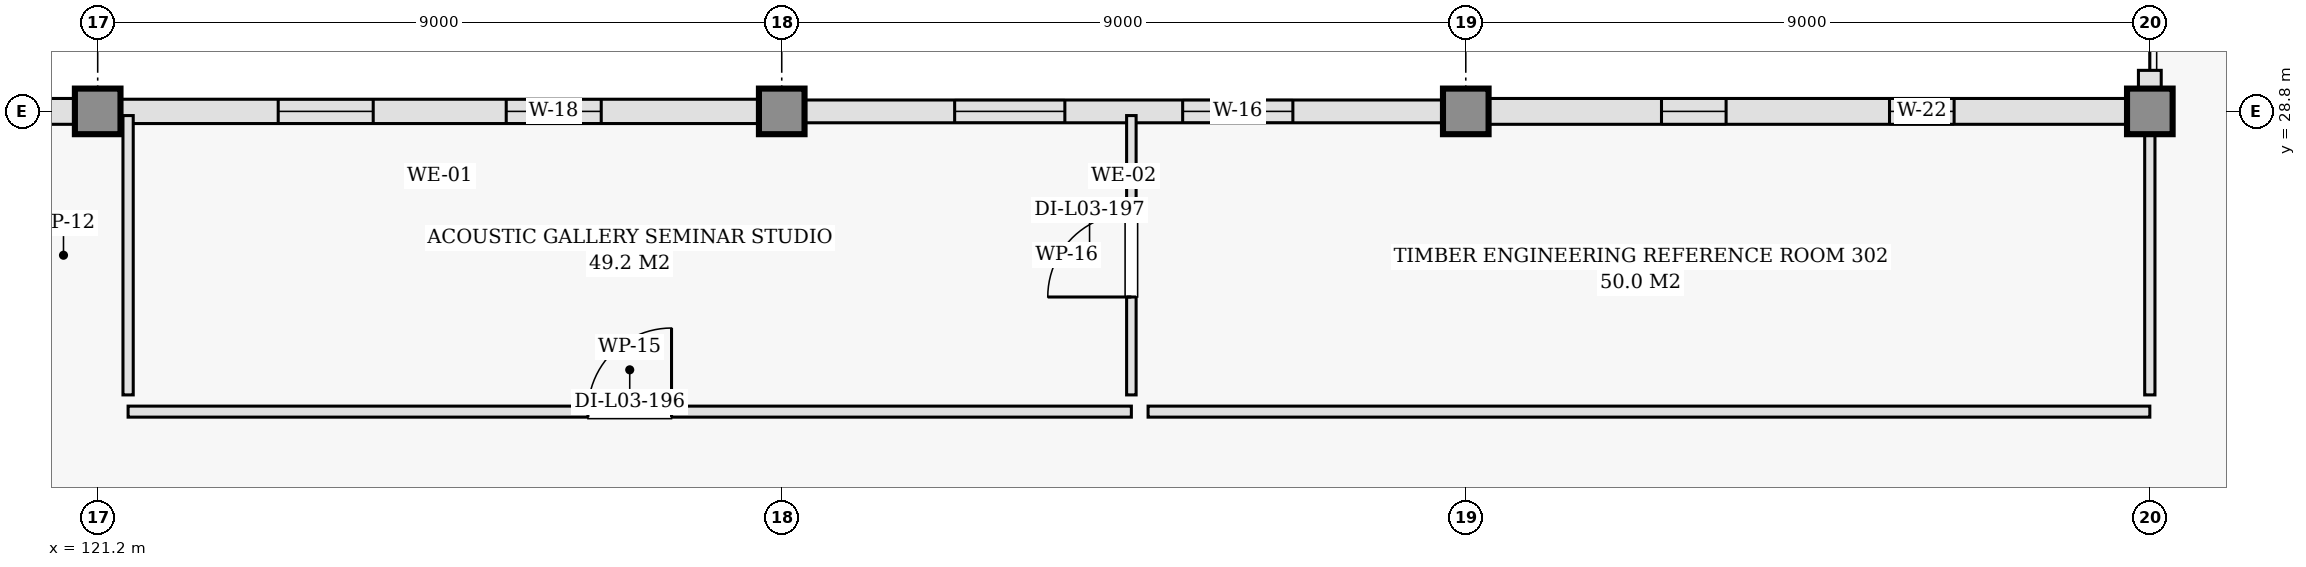
"""IFC4 building model, lengths in metres.
Left out: names, types, materials, properties, quantities, classifications, styles, units other than length and angle.
Written with IfcOpenShell. Run it as: python <this file> out.ifc"""

import sys

from ifc_helpers import new_model, si_unit, direction, frame, frame_2d, origin, origin_2d, place, context, subcontext, project, spatial, rectangle, extrude, element, fill, save


model = new_model("IFC4")
c1 = context("Model", 3, precision=1e-05, world=origin(), true_north=direction((0.0, 1.0)))
c2 = subcontext(c1, "Body", "Model", "MODEL_VIEW")
j1 = project(units=[si_unit("LENGTHUNIT", "METRE"), si_unit("PLANEANGLEUNIT", "RADIAN")], contexts=[c1])
p1 = place(None, origin())
s1 = spatial("IfcSite", under=j1, at=p1, CompositionType="ELEMENT")
p2 = place(p1, origin())
s2 = spatial("IfcBuilding", under=s1, at=p2, CompositionType="ELEMENT")
p3 = place(p2, frame((0.0, 0.0, 13.8)))
s3 = spatial("IfcBuildingStorey", under=s2, at=p3, CompositionType="ELEMENT", Elevation=13.8)
for number, where, z_axis, x_axis in (
    (1, (121.2, 28.8, 0.0), (0.0, 0.0, 1.0), (1.0, 0.0, 0.0)),
    (2, (130.2, 28.8, 0.0), (0.0, 0.0, 1.0), (1.0, 0.0, 0.0)),
    (3, (139.2, 28.8, 0.0), (0.0, 0.0, 1.0), (1.0, 0.0, 0.0)),
    (4, (148.2, 28.8, 0.0), (0.0, 0.0, 1.0), (1.0, 0.0, 0.0)),
):
    element("IfcColumn", number, at=place(p3, frame(where, z_axis=z_axis, x_axis=x_axis)), inside=s3, PredefinedType="COLUMN", context=c2, shape_type="SweptSolid", body=[
        extrude(rectangle(XDim=0.6, YDim=0.6, at=origin_2d()), origin(), (0.0, 0.0, 1.0), 4.2),
    ])
p4 = place(p3, frame((148.2, 29.34, 0.0), z_axis=(0.0, 0.0, 1.0), x_axis=(0.0, -1.0, 0.0)))
e5 = element("IfcWall", 5, at=p4, inside=s3, PredefinedType="SOLIDWALL", context=c2, shape_type="SweptSolid", body=[
    extrude(rectangle(XDim=0.368, YDim=0.3, at=frame_2d((0.184, 0.0))), origin(), (0.0, 0.0, 1.0), 3.145),
])
p5 = place(p3, frame((148.2, 28.8, 0.0), z_axis=(0.0, 0.0, 1.0), x_axis=(-1.0, 0.0, 0.0)))
e6 = element("IfcWall", 6, at=p5, inside=s3, PredefinedType="SOLIDWALL", context=c2, shape_type="SweptSolid", body=[
    extrude(rectangle(XDim=9.0, YDim=0.34, at=frame_2d((4.5, 0.0))), origin(), (0.0, 0.0, 1.0), 3.145),
])
p6 = place(p5, frame((2.575, 0.0, 0.9)))
e7 = element("IfcOpeningElement", 7, at=p6, cuts=e6, PredefinedType="OPENING", context=c2, shape_type="SweptSolid", body=[
    extrude(rectangle(XDim=0.85, YDim=1.3, at=frame_2d((0.425, 0.65))), frame((0.0, 0.18, 0.0), z_axis=(0.0, -1.0, 0.0), x_axis=(1.0, 0.0, 0.0)), (0.0, 0.0, 1.0), 0.36),
])
p7 = place(p5, frame((5.575, 0.0, 0.9)))
e8 = element("IfcOpeningElement", 8, at=p7, cuts=e6, PredefinedType="OPENING", context=c2, shape_type="SweptSolid", body=[
    extrude(rectangle(XDim=0.85, YDim=1.3, at=frame_2d((0.425, 0.65))), frame((0.0, 0.18, 0.0), z_axis=(0.0, -1.0, 0.0), x_axis=(1.0, 0.0, 0.0)), (0.0, 0.0, 1.0), 0.36),
])
p8 = place(p3, frame((139.2, 28.8, 0.0), z_axis=(0.0, 0.0, 1.0), x_axis=(-1.0, 0.0, 0.0)))
e9 = element("IfcWall", 9, at=p8, inside=s3, PredefinedType="SOLIDWALL", context=c2, shape_type="SweptSolid", body=[
    extrude(rectangle(XDim=9.0, YDim=0.3, at=frame_2d((4.5, 0.0))), origin(), (0.0, 0.0, 1.0), 3.145),
])
p9 = place(p8, frame((2.275, 0.0, 0.9)))
e10 = element("IfcOpeningElement", 10, at=p9, cuts=e9, PredefinedType="OPENING", context=c2, shape_type="SweptSolid", body=[
    extrude(rectangle(XDim=1.45, YDim=1.6, at=frame_2d((0.725, 0.8))), frame((0.0, 0.16, 0.0), z_axis=(0.0, -1.0, 0.0), x_axis=(1.0, 0.0, 0.0)), (0.0, 0.0, 1.0), 0.32),
])
p10 = place(p8, frame((5.275, 0.0, 0.9)))
e11 = element("IfcOpeningElement", 11, at=p10, cuts=e9, PredefinedType="OPENING", context=c2, shape_type="SweptSolid", body=[
    extrude(rectangle(XDim=1.45, YDim=1.6, at=frame_2d((0.725, 0.8))), frame((0.0, 0.16, 0.0), z_axis=(0.0, -1.0, 0.0), x_axis=(1.0, 0.0, 0.0)), (0.0, 0.0, 1.0), 0.32),
])
p11 = place(p3, frame((130.2, 28.8, 0.0), z_axis=(0.0, 0.0, 1.0), x_axis=(-1.0, 0.0, 0.0)))
e12 = element("IfcWall", 12, at=p11, inside=s3, PredefinedType="SOLIDWALL", context=c2, shape_type="SweptSolid", body=[
    extrude(rectangle(XDim=9.0, YDim=0.32, at=frame_2d((4.5, 0.0))), origin(), (0.0, 0.0, 1.0), 3.145),
])
p12 = place(p11, frame((2.375, 0.0, 0.9)))
e13 = element("IfcOpeningElement", 13, at=p12, cuts=e12, PredefinedType="OPENING", context=c2, shape_type="SweptSolid", body=[
    extrude(rectangle(XDim=1.25, YDim=1.5, at=frame_2d((0.625, 0.75))), frame((0.0, 0.17, 0.0), z_axis=(0.0, -1.0, 0.0), x_axis=(1.0, 0.0, 0.0)), (0.0, 0.0, 1.0), 0.34),
])
p13 = place(p11, frame((5.375, 0.0, 0.9)))
e14 = element("IfcOpeningElement", 14, at=p13, cuts=e12, PredefinedType="OPENING", context=c2, shape_type="SweptSolid", body=[
    extrude(rectangle(XDim=1.25, YDim=1.5, at=frame_2d((0.625, 0.75))), frame((0.0, 0.17, 0.0), z_axis=(0.0, -1.0, 0.0), x_axis=(1.0, 0.0, 0.0)), (0.0, 0.0, 1.0), 0.34),
])
p14 = place(p3, frame((121.2, 28.8, 0.0), z_axis=(0.0, 0.0, 1.0), x_axis=(-1.0, 0.0, 0.0)))
e15 = element("IfcWall", 15, at=p14, inside=s3, PredefinedType="SOLIDWALL", context=c2, shape_type="SweptSolid", body=[
    extrude(rectangle(XDim=8.75, YDim=0.34, at=frame_2d((4.375, 0.0))), origin(), (0.0, 0.0, 1.0), 3.145),
])
p15 = place(p14, frame((2.392, 0.0, 0.9)))
e16 = element("IfcOpeningElement", 16, at=p15, cuts=e15, PredefinedType="OPENING", context=c2, shape_type="SweptSolid", body=[
    extrude(rectangle(XDim=1.05, YDim=1.4, at=frame_2d((0.525, 0.7))), frame((0.0, 0.18, 0.0), z_axis=(0.0, -1.0, 0.0), x_axis=(1.0, 0.0, 0.0)), (0.0, 0.0, 1.0), 0.36),
])
p16 = place(p14, frame((5.308, 0.0, 0.9)))
e17 = element("IfcOpeningElement", 17, at=p16, cuts=e15, PredefinedType="OPENING", context=c2, shape_type="SweptSolid", body=[
    extrude(rectangle(XDim=1.05, YDim=1.4, at=frame_2d((0.525, 0.7))), frame((0.0, 0.18, 0.0), z_axis=(0.0, -1.0, 0.0), x_axis=(1.0, 0.0, 0.0)), (0.0, 0.0, 1.0), 0.36),
])
p17 = place(p3, frame((121.6, 24.85, 0.0), z_axis=(0.0, 0.0, 1.0), x_axis=(1.0, 0.0, 0.0)))
e18 = element("IfcWall", 18, at=p17, inside=s3, PredefinedType="PARTITIONING", context=c2, shape_type="SweptSolid", body=[
    extrude(rectangle(XDim=13.2, YDim=0.145, at=frame_2d((6.6, 0.0))), origin(), (0.0, 0.0, 1.0), 3.96),
])
p18 = place(p17, frame((6.05, 0.0, 0.0)))
e19 = element("IfcOpeningElement", 19, at=p18, cuts=e18, PredefinedType="OPENING", context=c2, shape_type="SweptSolid", body=[
    extrude(rectangle(XDim=1.1, YDim=2.15, at=frame_2d((0.55, 1.075))), frame((0.0, 0.083, 0.0), z_axis=(0.0, -1.0, 0.0), x_axis=(1.0, 0.0, 0.0)), (0.0, 0.0, 1.0), 0.165),
])
p19 = place(p3, frame((121.6, 25.07, 0.0), z_axis=(0.0, 0.0, 1.0), x_axis=(0.0, 1.0, 0.0)))
e20 = element("IfcWall", 20, at=p19, inside=s3, PredefinedType="PARTITIONING", context=c2, shape_type="SweptSolid", body=[
    extrude(rectangle(XDim=3.675, YDim=0.135, at=frame_2d((1.837, 0.0))), origin(), (0.0, 0.0, 1.0), 3.145),
])
p20 = place(p3, frame((134.8, 25.07, 0.0), z_axis=(0.0, 0.0, 1.0), x_axis=(0.0, 1.0, 0.0)))
e21 = element("IfcWall", 21, at=p20, inside=s3, PredefinedType="PARTITIONING", context=c2, shape_type="SweptSolid", body=[
    extrude(rectangle(XDim=3.675, YDim=0.125, at=frame_2d((1.837, 0.0))), origin(), (0.0, 0.0, 1.0), 3.145),
])
p21 = place(p20, frame((1.288, 0.0, 0.0)))
e22 = element("IfcOpeningElement", 22, at=p21, cuts=e21, PredefinedType="OPENING", context=c2, shape_type="SweptSolid", body=[
    extrude(rectangle(XDim=1.1, YDim=2.15, at=frame_2d((0.55, 1.075))), frame((0.0, 0.073, 0.0), z_axis=(0.0, -1.0, 0.0), x_axis=(1.0, 0.0, 0.0)), (0.0, 0.0, 1.0), 0.145),
])
p22 = place(p3, frame((135.02, 24.85, 0.0), z_axis=(0.0, 0.0, 1.0), x_axis=(1.0, 0.0, 0.0)))
e23 = element("IfcWall", 23, at=p22, inside=s3, PredefinedType="PARTITIONING", context=c2, shape_type="SweptSolid", body=[
    extrude(rectangle(XDim=13.18, YDim=0.145, at=frame_2d((6.59, 0.0))), origin(), (0.0, 0.0, 1.0), 3.295),
])
p23 = place(p3, frame((148.2, 25.07, 0.0), z_axis=(0.0, 0.0, 1.0), x_axis=(0.0, 1.0, 0.0)))
e24 = element("IfcWall", 24, at=p23, inside=s3, PredefinedType="PARTITIONING", context=c2, shape_type="SweptSolid", body=[
    extrude(rectangle(XDim=3.49, YDim=0.135, at=frame_2d((1.745, 0.0))), origin(), (0.0, 0.0, 1.0), 3.295),
])
p24 = place(p6, origin())
e25 = element("IfcWindow", 25, at=p24, inside=s3, PartitioningType="DOUBLE_PANEL_VERTICAL", PredefinedType="WINDOW", context=c2, shape_type="SweptSolid", body=[
    extrude(rectangle(XDim=0.85, YDim=1.3, at=frame_2d((0.425, 0.65))), frame((0.0, 0.03, 0.0), z_axis=(0.0, -1.0, 0.0), x_axis=(1.0, 0.0, 0.0)), (0.0, 0.0, 1.0), 0.06),
])
fill(e7, e25)
p25 = place(p7, origin())
e26 = element("IfcWindow", 26, at=p25, inside=s3, PartitioningType="DOUBLE_PANEL_VERTICAL", PredefinedType="WINDOW", context=c2, shape_type="SweptSolid", body=[
    extrude(rectangle(XDim=0.85, YDim=1.3, at=frame_2d((0.425, 0.65))), frame((0.0, 0.03, 0.0), z_axis=(0.0, -1.0, 0.0), x_axis=(1.0, 0.0, 0.0)), (0.0, 0.0, 1.0), 0.06),
])
fill(e8, e26)
p26 = place(p9, origin())
e27 = element("IfcWindow", 27, at=p26, inside=s3, PartitioningType="DOUBLE_PANEL_VERTICAL", PredefinedType="WINDOW", context=c2, shape_type="SweptSolid", body=[
    extrude(rectangle(XDim=1.45, YDim=1.6, at=frame_2d((0.725, 0.8))), frame((0.0, 0.03, 0.0), z_axis=(0.0, -1.0, 0.0), x_axis=(1.0, 0.0, 0.0)), (0.0, 0.0, 1.0), 0.06),
])
fill(e10, e27)
p27 = place(p10, origin())
e28 = element("IfcWindow", 28, at=p27, inside=s3, PartitioningType="DOUBLE_PANEL_VERTICAL", PredefinedType="WINDOW", context=c2, shape_type="SweptSolid", body=[
    extrude(rectangle(XDim=1.45, YDim=1.6, at=frame_2d((0.725, 0.8))), frame((0.0, 0.03, 0.0), z_axis=(0.0, -1.0, 0.0), x_axis=(1.0, 0.0, 0.0)), (0.0, 0.0, 1.0), 0.06),
])
fill(e11, e28)
p28 = place(p12, origin())
e29 = element("IfcWindow", 29, at=p28, inside=s3, PartitioningType="DOUBLE_PANEL_VERTICAL", PredefinedType="WINDOW", context=c2, shape_type="SweptSolid", body=[
    extrude(rectangle(XDim=1.25, YDim=1.5, at=frame_2d((0.625, 0.75))), frame((0.0, 0.03, 0.0), z_axis=(0.0, -1.0, 0.0), x_axis=(1.0, 0.0, 0.0)), (0.0, 0.0, 1.0), 0.06),
])
fill(e13, e29)
p29 = place(p13, origin())
e30 = element("IfcWindow", 30, at=p29, inside=s3, PartitioningType="DOUBLE_PANEL_VERTICAL", PredefinedType="WINDOW", context=c2, shape_type="SweptSolid", body=[
    extrude(rectangle(XDim=1.25, YDim=1.5, at=frame_2d((0.625, 0.75))), frame((0.0, 0.03, 0.0), z_axis=(0.0, -1.0, 0.0), x_axis=(1.0, 0.0, 0.0)), (0.0, 0.0, 1.0), 0.06),
])
fill(e14, e30)
p30 = place(p18, origin())
e31 = element("IfcDoor", 31, at=p30, inside=s3, OperationType="SINGLE_SWING_RIGHT", PredefinedType="DOOR", context=c2, shape_type="SweptSolid", body=[
    extrude(rectangle(XDim=1.1, YDim=2.15, at=frame_2d((0.55, 1.075))), frame((0.0, 0.025, 0.0), z_axis=(0.0, -1.0, 0.0), x_axis=(1.0, 0.0, 0.0)), (0.0, 0.0, 1.0), 0.05),
])
fill(e19, e31)
p31 = place(p21, origin())
e32 = element("IfcDoor", 32, at=p31, inside=s3, OperationType="SINGLE_SWING_LEFT", PredefinedType="DOOR", context=c2, shape_type="SweptSolid", body=[
    extrude(rectangle(XDim=1.1, YDim=2.15, at=frame_2d((0.55, 1.075))), frame((0.0, 0.025, 0.0), z_axis=(0.0, -1.0, 0.0), x_axis=(1.0, 0.0, 0.0)), (0.0, 0.0, 1.0), 0.05),
])
fill(e22, e32)
save(model, sys.argv[1])
